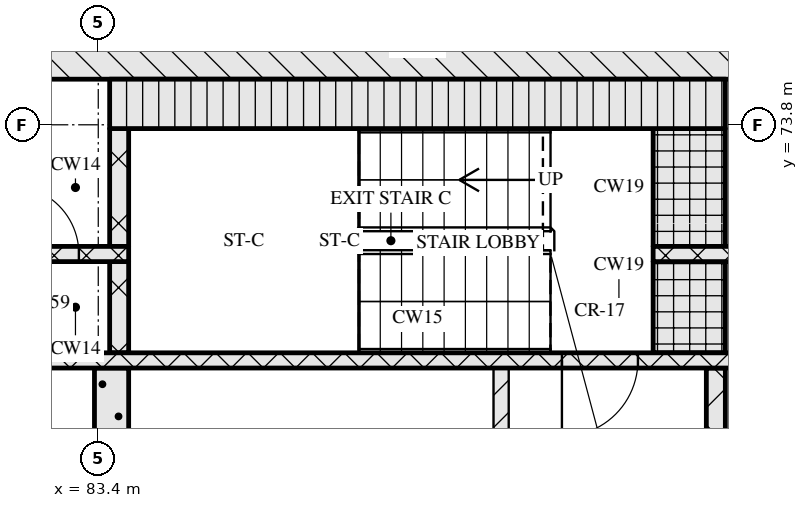
"""IFC4 building model, lengths in metres.
Left out: names, types, materials, properties, quantities, classifications, styles, units other than length and angle.
Written with IfcOpenShell. Run it as: python <this file> out.ifc"""

import sys

from ifc_helpers import new_model, si_unit, direction, frame, frame_2d, origin, place, context, subcontext, project, spatial, rectangle, extrude, element, fill, save


model = new_model("IFC4")
c1 = context("Model", 3, precision=1e-05, world=origin(), true_north=direction((0.0, 1.0)))
c2 = subcontext(c1, "Body", "Model", "MODEL_VIEW")
j1 = project(units=[si_unit("LENGTHUNIT", "METRE"), si_unit("PLANEANGLEUNIT", "RADIAN")], contexts=[c1])
p1 = place(None, origin())
s1 = spatial("IfcSite", under=j1, at=p1, CompositionType="ELEMENT")
p2 = place(p1, origin())
s2 = spatial("IfcBuilding", under=s1, at=p2, CompositionType="ELEMENT")
p3 = place(p2, frame((0.0, 0.0, 161.85)))
s3 = spatial("IfcBuildingStorey", under=s2, at=p3, CompositionType="ELEMENT", Elevation=161.85)
p4 = place(p3, frame((67.0, 74.8, 0.0), z_axis=(0.0, 0.0, 1.0), x_axis=(1.0, 0.0, 0.0)))
e1 = element("IfcWall", 1, at=p4, inside=s3, PredefinedType="SOLIDWALL", context=c2, shape_type="SweptSolid", body=[
    extrude(rectangle(XDim=41.2, YDim=0.8, at=frame_2d((20.6, 0.0))), origin(), (0.0, 0.0, 1.0), 3.32),
])
p5 = place(p3, frame((83.575, 68.0, 0.0), z_axis=(0.0, 0.0, 1.0), x_axis=(0.0, 1.0, 0.0)))
e2 = element("IfcWall", 2, at=p5, inside=s3, PredefinedType="SOLIDWALL", context=c2, shape_type="SweptSolid", body=[
    extrude(rectangle(XDim=2.6, YDim=0.45, at=frame_2d((1.3, 0.0))), origin(), (0.0, 0.0, 1.0), 3.32),
])
p6 = place(p3, frame((88.7, 68.0, 0.0), z_axis=(0.0, 0.0, 1.0), x_axis=(0.0, 1.0, 0.0)))
e3 = element("IfcWall", 3, at=p6, inside=s3, PredefinedType="PARTITIONING", context=c2, shape_type="SweptSolid", body=[
    extrude(rectangle(XDim=2.6, YDim=0.2, at=frame_2d((1.3, 0.0))), origin(), (0.0, 0.0, 1.0), 3.32),
])
p7 = place(p3, frame((91.525, 68.0, 0.0), z_axis=(0.0, 0.0, 1.0), x_axis=(0.0, 1.0, 0.0)))
e4 = element("IfcWall", 4, at=p7, inside=s3, PredefinedType="SOLIDWALL", context=c2, shape_type="SweptSolid", body=[
    extrude(rectangle(XDim=2.6, YDim=0.25, at=frame_2d((1.3, 0.0))), origin(), (0.0, 0.0, 1.0), 3.32),
])
p8 = place(p3, frame((67.8, 70.7, 0.0), z_axis=(0.0, 0.0, 1.0), x_axis=(1.0, 0.0, 0.0)))
e5 = element("IfcWall", 5, at=p8, inside=s3, PredefinedType="SOLIDWALL", context=c2, shape_type="SweptSolid", body=[
    extrude(rectangle(XDim=39.6, YDim=0.2, at=frame_2d((19.8, 0.0))), origin(), (0.0, 0.0, 1.0), 3.32),
])
p9 = place(p8, frame((0.65, 0.0, 0.0)))
e6 = element("IfcOpeningElement", 6, at=p9, cuts=e5, PredefinedType="OPENING", context=c2, shape_type="SweptSolid", body=[
    extrude(rectangle(XDim=1.1, YDim=2.1, at=frame_2d((0.55, 1.05))), frame((0.0, 0.11, 0.0), z_axis=(0.0, -1.0, 0.0), x_axis=(1.0, 0.0, 0.0)), (0.0, 0.0, 1.0), 0.22),
])
p10 = place(p8, frame((3.25, 0.0, 0.0)))
e7 = element("IfcOpeningElement", 7, at=p10, cuts=e5, PredefinedType="OPENING", context=c2, shape_type="SweptSolid", body=[
    extrude(rectangle(XDim=1.1, YDim=2.1, at=frame_2d((0.55, 1.05))), frame((0.0, 0.11, 0.0), z_axis=(0.0, -1.0, 0.0), x_axis=(1.0, 0.0, 0.0)), (0.0, 0.0, 1.0), 0.22),
])
p11 = place(p8, frame((5.9, 0.0, 0.0)))
e8 = element("IfcOpeningElement", 8, at=p11, cuts=e5, PredefinedType="OPENING", context=c2, shape_type="SweptSolid", body=[
    extrude(rectangle(XDim=1.0, YDim=2.1, at=frame_2d((0.5, 1.05))), frame((0.0, 0.11, 0.0), z_axis=(0.0, -1.0, 0.0), x_axis=(1.0, 0.0, 0.0)), (0.0, 0.0, 1.0), 0.22),
])
p12 = place(p8, frame((21.7, 0.0, 0.0)))
e9 = element("IfcOpeningElement", 9, at=p12, cuts=e5, PredefinedType="OPENING", context=c2, shape_type="SweptSolid", body=[
    extrude(rectangle(XDim=1.0, YDim=2.1, at=frame_2d((0.5, 1.05))), frame((0.0, 0.11, 0.0), z_axis=(0.0, -1.0, 0.0), x_axis=(1.0, 0.0, 0.0)), (0.0, 0.0, 1.0), 0.22),
])
p13 = place(p8, frame((32.7, 0.0, 0.0)))
e10 = element("IfcOpeningElement", 10, at=p13, cuts=e5, PredefinedType="OPENING", context=c2, shape_type="SweptSolid", body=[
    extrude(rectangle(XDim=1.0, YDim=2.1, at=frame_2d((0.5, 1.05))), frame((0.0, 0.11, 0.0), z_axis=(0.0, -1.0, 0.0), x_axis=(1.0, 0.0, 0.0)), (0.0, 0.0, 1.0), 0.22),
])
p14 = place(p8, frame((35.25, 0.0, 0.0)))
e11 = element("IfcOpeningElement", 11, at=p14, cuts=e5, PredefinedType="OPENING", context=c2, shape_type="SweptSolid", body=[
    extrude(rectangle(XDim=1.1, YDim=2.1, at=frame_2d((0.55, 1.05))), frame((0.0, 0.11, 0.0), z_axis=(0.0, -1.0, 0.0), x_axis=(1.0, 0.0, 0.0)), (0.0, 0.0, 1.0), 0.22),
])
p15 = place(p8, frame((37.85, 0.0, 0.0)))
e12 = element("IfcOpeningElement", 12, at=p15, cuts=e5, PredefinedType="OPENING", context=c2, shape_type="SweptSolid", body=[
    extrude(rectangle(XDim=1.1, YDim=2.1, at=frame_2d((0.55, 1.05))), frame((0.0, 0.11, 0.0), z_axis=(0.0, -1.0, 0.0), x_axis=(1.0, 0.0, 0.0)), (0.0, 0.0, 1.0), 0.22),
])
p16 = place(p3, frame((83.675, 70.8, 0.0), z_axis=(0.0, 0.0, 1.0), x_axis=(0.0, 1.0, 0.0)))
e13 = element("IfcWall", 13, at=p16, inside=s3, PredefinedType="SOLIDWALL", context=c2, shape_type="SweptSolid", body=[
    extrude(rectangle(XDim=1.2, YDim=0.25, at=frame_2d((0.6, 0.0))), origin(), (0.0, 0.0, 1.0), 3.32),
])
p17 = place(p3, frame((91.175, 70.8, 0.0), z_axis=(0.0, 0.0, 1.0), x_axis=(0.0, 1.0, 0.0)))
e14 = element("IfcWall", 14, at=p17, inside=s3, PredefinedType="SOLIDWALL", context=c2, shape_type="SweptSolid", body=[
    extrude(rectangle(XDim=1.2, YDim=0.95, at=frame_2d((0.6, 0.0))), origin(), (0.0, 0.0, 1.0), 3.32),
])
p18 = place(p3, frame((72.8, 72.1, 0.0), z_axis=(0.0, 0.0, 1.0), x_axis=(1.0, 0.0, 0.0)))
e15 = element("IfcWall", 15, at=p18, inside=s3, PredefinedType="SOLIDWALL", context=c2, shape_type="SweptSolid", body=[
    extrude(rectangle(XDim=11.0, YDim=0.2, at=frame_2d((5.5, 0.0))), origin(), (0.0, 0.0, 1.0), 3.32),
])
p19 = place(p18, frame((1.25, 0.0, 0.0)))
e16 = element("IfcOpeningElement", 16, at=p19, cuts=e15, PredefinedType="OPENING", context=c2, shape_type="SweptSolid", body=[
    extrude(rectangle(XDim=0.9, YDim=2.1, at=frame_2d((0.45, 1.05))), frame((0.0, 0.11, 0.0), z_axis=(0.0, -1.0, 0.0), x_axis=(1.0, 0.0, 0.0)), (0.0, 0.0, 1.0), 0.22),
])
p20 = place(p18, frame((4.65, 0.0, 0.0)))
e17 = element("IfcOpeningElement", 17, at=p20, cuts=e15, PredefinedType="OPENING", context=c2, shape_type="SweptSolid", body=[
    extrude(rectangle(XDim=0.9, YDim=2.1, at=frame_2d((0.45, 1.05))), frame((0.0, 0.11, 0.0), z_axis=(0.0, -1.0, 0.0), x_axis=(1.0, 0.0, 0.0)), (0.0, 0.0, 1.0), 0.22),
])
p21 = place(p18, frame((7.47, 0.0, 0.0)))
e18 = element("IfcOpeningElement", 18, at=p21, cuts=e15, PredefinedType="OPENING", context=c2, shape_type="SweptSolid", body=[
    extrude(rectangle(XDim=0.9, YDim=2.1, at=frame_2d((0.45, 1.05))), frame((0.0, 0.11, 0.0), z_axis=(0.0, -1.0, 0.0), x_axis=(1.0, 0.0, 0.0)), (0.0, 0.0, 1.0), 0.22),
])
p22 = place(p18, frame((9.445, 0.0, 0.0)))
e19 = element("IfcOpeningElement", 19, at=p22, cuts=e15, PredefinedType="OPENING", context=c2, shape_type="SweptSolid", body=[
    extrude(rectangle(XDim=0.9, YDim=2.1, at=frame_2d((0.45, 1.05))), frame((0.0, 0.11, 0.0), z_axis=(0.0, -1.0, 0.0), x_axis=(1.0, 0.0, 0.0)), (0.0, 0.0, 1.0), 0.22),
])
p23 = place(p3, frame((90.7, 72.1, 0.0), z_axis=(0.0, 0.0, 1.0), x_axis=(1.0, 0.0, 0.0)))
e20 = element("IfcWall", 20, at=p23, inside=s3, PredefinedType="SOLIDWALL", context=c2, shape_type="SweptSolid", body=[
    extrude(rectangle(XDim=11.7, YDim=0.2, at=frame_2d((5.85, 0.0))), origin(), (0.0, 0.0, 1.0), 3.32),
])
p24 = place(p23, frame((1.6, 0.0, 0.0)))
e21 = element("IfcOpeningElement", 21, at=p24, cuts=e20, PredefinedType="OPENING", context=c2, shape_type="SweptSolid", body=[
    extrude(rectangle(XDim=0.9, YDim=2.1, at=frame_2d((0.45, 1.05))), frame((0.0, 0.11, 0.0), z_axis=(0.0, -1.0, 0.0), x_axis=(1.0, 0.0, 0.0)), (0.0, 0.0, 1.0), 0.22),
])
p25 = place(p23, frame((5.335, 0.0, 0.0)))
e22 = element("IfcOpeningElement", 22, at=p25, cuts=e20, PredefinedType="OPENING", context=c2, shape_type="SweptSolid", body=[
    extrude(rectangle(XDim=0.9, YDim=2.1, at=frame_2d((0.45, 1.05))), frame((0.0, 0.11, 0.0), z_axis=(0.0, -1.0, 0.0), x_axis=(1.0, 0.0, 0.0)), (0.0, 0.0, 1.0), 0.22),
])
p26 = place(p23, frame((9.55, 0.0, 0.0)))
e23 = element("IfcOpeningElement", 23, at=p26, cuts=e20, PredefinedType="OPENING", context=c2, shape_type="SweptSolid", body=[
    extrude(rectangle(XDim=0.9, YDim=2.1, at=frame_2d((0.45, 1.05))), frame((0.0, 0.11, 0.0), z_axis=(0.0, -1.0, 0.0), x_axis=(1.0, 0.0, 0.0)), (0.0, 0.0, 1.0), 0.22),
])
p27 = place(p3, frame((83.675, 72.2, 0.0), z_axis=(0.0, 0.0, 1.0), x_axis=(0.0, 1.0, 0.0)))
e24 = element("IfcWall", 24, at=p27, inside=s3, PredefinedType="SOLIDWALL", context=c2, shape_type="SweptSolid", body=[
    extrude(rectangle(XDim=1.55, YDim=0.25, at=frame_2d((0.775, 0.0))), origin(), (0.0, 0.0, 1.0), 3.32),
])
p28 = place(p3, frame((91.175, 72.2, 0.0), z_axis=(0.0, 0.0, 1.0), x_axis=(0.0, 1.0, 0.0)))
e25 = element("IfcWall", 25, at=p28, inside=s3, PredefinedType="SOLIDWALL", context=c2, shape_type="SweptSolid", body=[
    extrude(rectangle(XDim=1.55, YDim=0.95, at=frame_2d((0.775, 0.0))), origin(), (0.0, 0.0, 1.0), 3.32),
])
p29 = place(p3, frame((83.55, 74.075, 0.0), z_axis=(0.0, 0.0, 1.0), x_axis=(1.0, 0.0, 0.0)))
e26 = element("IfcWall", 26, at=p29, inside=s3, PredefinedType="SOLIDWALL", context=c2, shape_type="SweptSolid", body=[
    extrude(rectangle(XDim=8.1, YDim=0.65, at=frame_2d((4.05, 0.0))), origin(), (0.0, 0.0, 1.0), 3.32),
])
p30 = place(p12, origin())
e27 = element("IfcDoor", 27, at=p30, inside=s3, OperationType="SINGLE_SWING_RIGHT", PredefinedType="DOOR", context=c2, shape_type="SweptSolid", body=[
    extrude(rectangle(XDim=1.0, YDim=2.1, at=frame_2d((0.5, 1.05))), frame((0.0, 0.025, 0.0), z_axis=(0.0, -1.0, 0.0), x_axis=(1.0, 0.0, 0.0)), (0.0, 0.0, 1.0), 0.05),
])
fill(e9, e27)
p31 = place(p22, origin())
e28 = element("IfcDoor", 28, at=p31, inside=s3, OperationType="SINGLE_SWING_LEFT", PredefinedType="DOOR", context=c2, shape_type="SweptSolid", body=[
    extrude(rectangle(XDim=0.9, YDim=2.1, at=frame_2d((0.45, 1.05))), frame((0.0, 0.025, 0.0), z_axis=(0.0, -1.0, 0.0), x_axis=(1.0, 0.0, 0.0)), (0.0, 0.0, 1.0), 0.05),
])
fill(e19, e28)
save(model, sys.argv[1])
